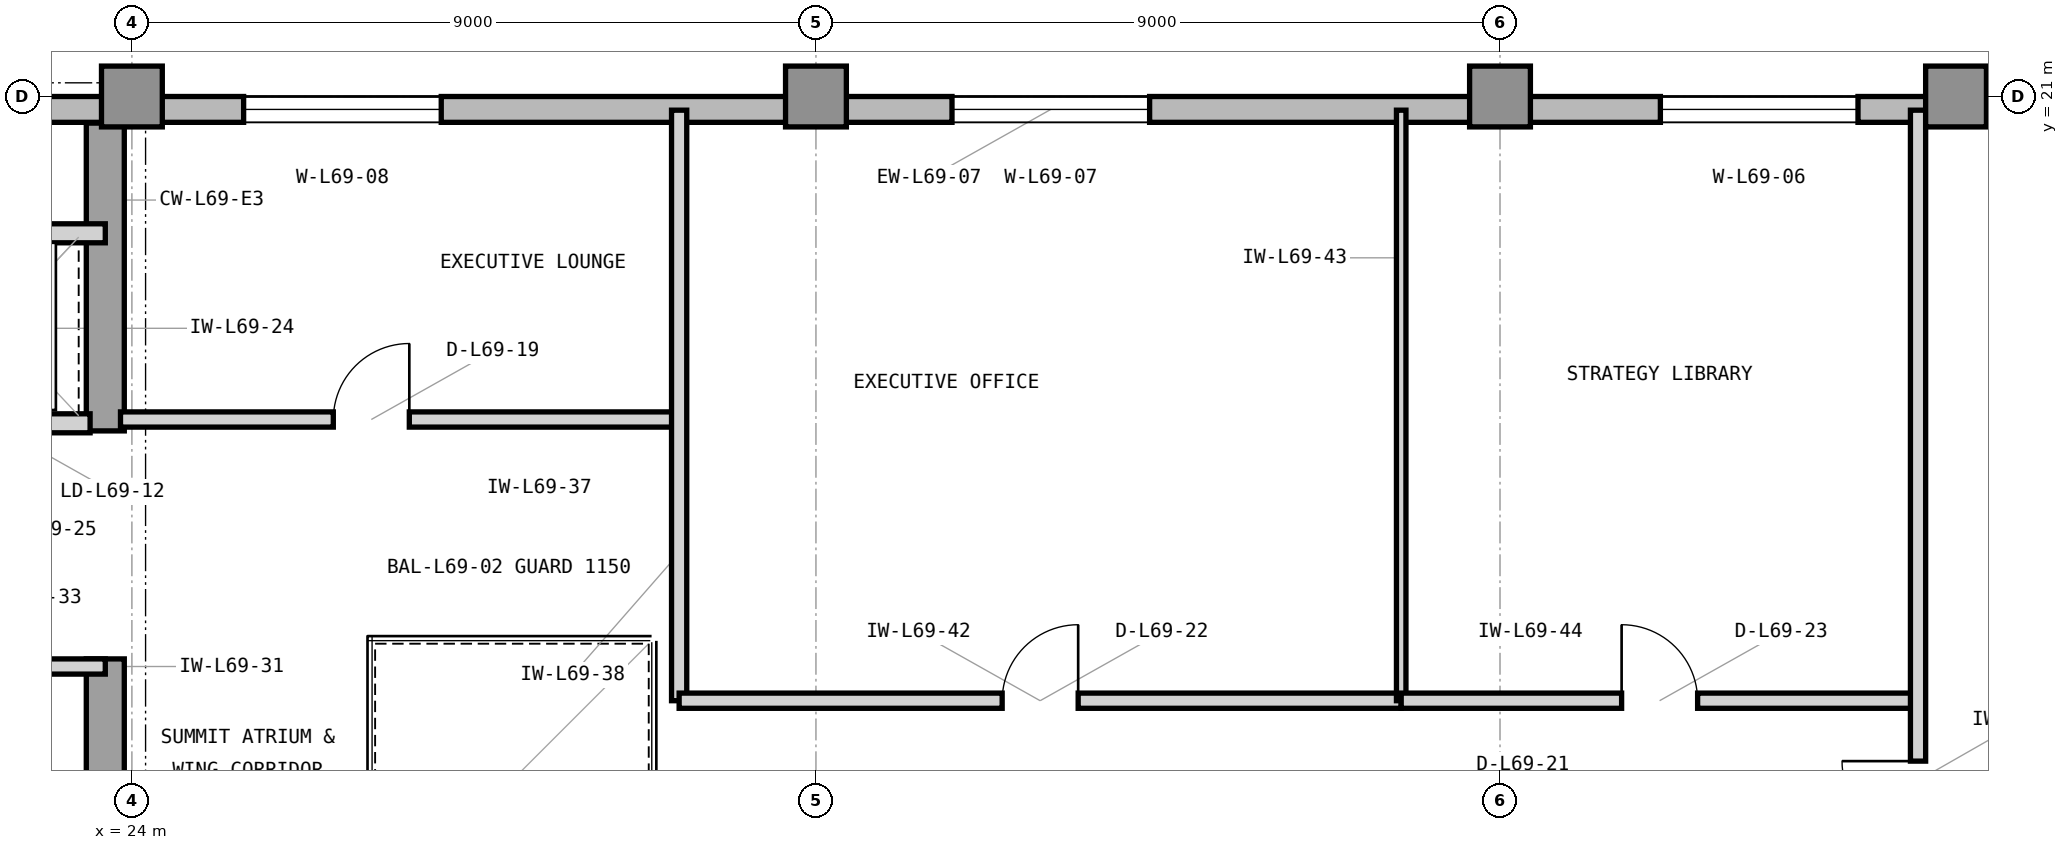
"""IFC4 building model, lengths in metres.
Left out: names, types, materials, properties, quantities, classifications, styles, units other than length and angle.
Written with IfcOpenShell. Run it as: python <this file> out.ifc"""

import sys

from ifc_helpers import new_model, si_unit, direction, frame, frame_2d, origin, origin_2d, place, context, subcontext, project, spatial, rectangle, extrude, element, fill, save


model = new_model("IFC4")
c1 = context("Model", 3, precision=1e-05, world=origin(), true_north=direction((0.0, 1.0)))
c2 = subcontext(c1, "Body", "Model", "MODEL_VIEW")
j1 = project(units=[si_unit("LENGTHUNIT", "METRE"), si_unit("PLANEANGLEUNIT", "RADIAN")], contexts=[c1])
p1 = place(None, origin())
s1 = spatial("IfcSite", under=j1, at=p1, CompositionType="ELEMENT")
p2 = place(p1, origin())
s2 = spatial("IfcBuilding", under=s1, at=p2, CompositionType="ELEMENT")
p3 = place(p2, frame((0.0, 0.0, 282.0)))
s3 = spatial("IfcBuildingStorey", under=s2, at=p3, CompositionType="ELEMENT", Elevation=282.0)
p4 = place(p3, frame((23.65, 10.4, 0.0), z_axis=(0.0, 0.0, 1.0), x_axis=(0.0, 1.0, 0.0)))
e1 = element("IfcWall", 1, at=p4, inside=s3, PredefinedType="SHEAR", context=c2, shape_type="SweptSolid", body=[
    extrude(rectangle(XDim=3.2, YDim=0.5, at=frame_2d((1.6, 0.0))), origin(), (0.0, 0.0, 1.0), 3.9),
])
p5 = place(p3, frame((23.65, 16.6, 0.0), z_axis=(0.0, 0.0, 1.0), x_axis=(0.0, 1.0, 0.0)))
e2 = element("IfcWall", 2, at=p5, inside=s3, PredefinedType="SHEAR", context=c2, shape_type="SweptSolid", body=[
    extrude(rectangle(XDim=4.05, YDim=0.5, at=frame_2d((2.025, 0.0))), origin(), (0.0, 0.0, 1.0), 3.9),
])
for number, where, z_axis, x_axis in (
    (3, (24.0, 21.0, 0.0), (0.0, 0.0, 1.0), (1.0, 0.0, 0.0)),
    (4, (33.0, 21.0, 0.0), (0.0, 0.0, 1.0), (1.0, 0.0, 0.0)),
    (5, (42.0, 21.0, 0.0), (0.0, 0.0, 1.0), (1.0, 0.0, 0.0)),
    (6, (48.0, 21.0, 0.0), (0.0, 0.0, 1.0), (1.0, 0.0, 0.0)),
):
    element("IfcColumn", number, at=place(p3, frame(where, z_axis=z_axis, x_axis=x_axis)), inside=s3, PredefinedType="COLUMN", context=c2, shape_type="SweptSolid", body=[
        extrude(rectangle(XDim=0.8, YDim=0.8, at=origin_2d()), origin(), (0.0, 0.0, 1.0), 3.9),
    ])
p6 = place(p3, frame((52.4, 20.83, 0.0), z_axis=(0.0, 0.0, 1.0), x_axis=(-1.0, 0.0, 0.0)))
e7 = element("IfcWall", 7, at=p6, inside=s3, PredefinedType="STANDARD", context=c2, shape_type="SweptSolid", body=[
    extrude(rectangle(XDim=32.62, YDim=0.34, at=frame_2d((16.31, 0.0))), origin(), (0.0, 0.0, 1.0), 3.715),
])
p7 = place(p6, frame((5.69, 0.0, 0.8)))
e8 = element("IfcOpeningElement", 8, at=p7, cuts=e7, PredefinedType="OPENING", context=c2, shape_type="SweptSolid", body=[
    extrude(rectangle(XDim=2.6, YDim=2.35, at=frame_2d((1.3, 1.175))), frame((0.0, 0.18, 0.0), z_axis=(0.0, -1.0, 0.0), x_axis=(1.0, 0.0, 0.0)), (0.0, 0.0, 1.0), 0.36),
])
p8 = place(p6, frame((15.01, 0.0, 0.8)))
e9 = element("IfcOpeningElement", 9, at=p8, cuts=e7, PredefinedType="OPENING", context=c2, shape_type="SweptSolid", body=[
    extrude(rectangle(XDim=2.6, YDim=2.35, at=frame_2d((1.3, 1.175))), frame((0.0, 0.18, 0.0), z_axis=(0.0, -1.0, 0.0), x_axis=(1.0, 0.0, 0.0)), (0.0, 0.0, 1.0), 0.36),
])
p9 = place(p6, frame((24.33, 0.0, 0.8)))
e10 = element("IfcOpeningElement", 10, at=p9, cuts=e7, PredefinedType="OPENING", context=c2, shape_type="SweptSolid", body=[
    extrude(rectangle(XDim=2.6, YDim=2.35, at=frame_2d((1.3, 1.175))), frame((0.0, 0.18, 0.0), z_axis=(0.0, -1.0, 0.0), x_axis=(1.0, 0.0, 0.0)), (0.0, 0.0, 1.0), 0.36),
])
p10 = place(p3, frame((21.05, 16.7, 0.0), z_axis=(0.0, 0.0, 1.0), x_axis=(1.0, 0.0, 0.0)))
e11 = element("IfcWall", 11, at=p10, inside=s3, PredefinedType="PARTITIONING", context=c2, shape_type="SweptSolid", body=[
    extrude(rectangle(XDim=2.4, YDim=0.25, at=frame_2d((1.2, 0.0))), origin(), (0.0, 0.0, 1.0), 3.354),
])
p11 = place(p10, frame((0.52, 0.0, 0.0)))
e12 = element("IfcOpeningElement", 12, at=p11, cuts=e11, PredefinedType="OPENING", context=c2, shape_type="SweptSolid", body=[
    extrude(rectangle(XDim=1.15, YDim=2.25, at=frame_2d((0.575, 1.125))), frame((0.0, 0.135, 0.0), z_axis=(0.0, -1.0, 0.0), x_axis=(1.0, 0.0, 0.0)), (0.0, 0.0, 1.0), 0.27),
])
p12 = place(p3, frame((16.45, 19.2, 0.0), z_axis=(0.0, 0.0, 1.0), x_axis=(1.0, 0.0, 0.0)))
e13 = element("IfcWall", 13, at=p12, inside=s3, PredefinedType="PARTITIONING", context=c2, shape_type="SweptSolid", body=[
    extrude(rectangle(XDim=7.2, YDim=0.25, at=frame_2d((3.6, 0.0))), origin(), (0.0, 0.0, 1.0), 3.63),
])
p13 = place(p3, frame((18.45, 13.5, 0.0), z_axis=(0.0, 0.0, 1.0), x_axis=(1.0, 0.0, 0.0)))
e14 = element("IfcWall", 14, at=p13, inside=s3, PredefinedType="PARTITIONING", context=c2, shape_type="SweptSolid", body=[
    extrude(rectangle(XDim=5.2, YDim=0.2, at=frame_2d((2.6, 0.0))), origin(), (0.0, 0.0, 1.0), 3.354),
])
p14 = place(p13, frame((2.125, 0.0, 0.0)))
e15 = element("IfcOpeningElement", 15, at=p14, cuts=e14, PredefinedType="OPENING", context=c2, shape_type="SweptSolid", body=[
    extrude(rectangle(XDim=0.95, YDim=2.1, at=frame_2d((0.475, 1.05))), frame((0.0, 0.11, 0.0), z_axis=(0.0, -1.0, 0.0), x_axis=(1.0, 0.0, 0.0)), (0.0, 0.0, 1.0), 0.22),
])
p15 = place(p3, frame((23.85, 16.75, 0.0), z_axis=(0.0, 0.0, 1.0), x_axis=(1.0, 0.0, 0.0)))
e16 = element("IfcWall", 16, at=p15, inside=s3, PredefinedType="PARTITIONING", context=c2, shape_type="SweptSolid", body=[
    extrude(rectangle(XDim=7.35, YDim=0.2, at=frame_2d((3.675, 0.0))), origin(), (0.0, 0.0, 1.0), 3.63),
])
p16 = place(p15, frame((2.8, 0.0, 0.0)))
e17 = element("IfcOpeningElement", 17, at=p16, cuts=e16, PredefinedType="OPENING", context=c2, shape_type="SweptSolid", body=[
    extrude(rectangle(XDim=1.0, YDim=2.15, at=frame_2d((0.5, 1.075))), frame((0.0, 0.11, 0.0), z_axis=(0.0, -1.0, 0.0), x_axis=(1.0, 0.0, 0.0)), (0.0, 0.0, 1.0), 0.22),
])
p17 = place(p3, frame((31.2, 13.05, 0.0), z_axis=(0.0, 0.0, 1.0), x_axis=(0.0, 1.0, 0.0)))
e18 = element("IfcWall", 18, at=p17, inside=s3, PredefinedType="PARTITIONING", context=c2, shape_type="SweptSolid", body=[
    extrude(rectangle(XDim=7.77, YDim=0.2, at=frame_2d((3.885, 0.0))), origin(), (0.0, 0.0, 1.0), 3.63),
])
p18 = place(p3, frame((31.2, 13.05, 0.0), z_axis=(0.0, 0.0, 1.0), x_axis=(1.0, 0.0, 0.0)))
e19 = element("IfcWall", 19, at=p18, inside=s3, PredefinedType="PARTITIONING", context=c2, shape_type="SweptSolid", body=[
    extrude(rectangle(XDim=9.5, YDim=0.2, at=frame_2d((4.75, 0.0))), origin(), (0.0, 0.0, 1.0), 3.63),
])
p19 = place(p18, frame((4.25, 0.0, 0.0)))
e20 = element("IfcOpeningElement", 20, at=p19, cuts=e19, PredefinedType="OPENING", context=c2, shape_type="SweptSolid", body=[
    extrude(rectangle(XDim=1.0, YDim=2.15, at=frame_2d((0.5, 1.075))), frame((0.0, 0.11, 0.0), z_axis=(0.0, -1.0, 0.0), x_axis=(1.0, 0.0, 0.0)), (0.0, 0.0, 1.0), 0.22),
])
p20 = place(p3, frame((40.7, 13.05, 0.0), z_axis=(0.0, 0.0, 1.0), x_axis=(0.0, 1.0, 0.0)))
e21 = element("IfcWall", 21, at=p20, inside=s3, PredefinedType="PARTITIONING", context=c2, shape_type="SweptSolid", body=[
    extrude(rectangle(XDim=7.77, YDim=0.125, at=frame_2d((3.885, 0.0))), origin(), (0.0, 0.0, 1.0), 3.63),
])
p21 = place(p3, frame((40.7, 13.05, 0.0), z_axis=(0.0, 0.0, 1.0), x_axis=(1.0, 0.0, 0.0)))
e22 = element("IfcWall", 22, at=p21, inside=s3, PredefinedType="PARTITIONING", context=c2, shape_type="SweptSolid", body=[
    extrude(rectangle(XDim=6.8, YDim=0.2, at=frame_2d((3.4, 0.0))), origin(), (0.0, 0.0, 1.0), 3.63),
])
p22 = place(p21, frame((2.9, 0.0, 0.0)))
e23 = element("IfcOpeningElement", 23, at=p22, cuts=e22, PredefinedType="OPENING", context=c2, shape_type="SweptSolid", body=[
    extrude(rectangle(XDim=1.0, YDim=2.15, at=frame_2d((0.5, 1.075))), frame((0.0, 0.11, 0.0), z_axis=(0.0, -1.0, 0.0), x_axis=(1.0, 0.0, 0.0)), (0.0, 0.0, 1.0), 0.22),
])
p23 = place(p3, frame((47.5, 3.18, 0.0), z_axis=(0.0, 0.0, 1.0), x_axis=(0.0, 1.0, 0.0)))
e24 = element("IfcWall", 24, at=p23, inside=s3, PredefinedType="PARTITIONING", context=c2, shape_type="SweptSolid", body=[
    extrude(rectangle(XDim=17.64, YDim=0.2, at=frame_2d((8.82, 0.0))), origin(), (0.0, 0.0, 1.0), 3.63),
])
p24 = place(p23, frame((8.075, 0.0, 0.0)))
e25 = element("IfcOpeningElement", 25, at=p24, cuts=e24, PredefinedType="OPENING", context=c2, shape_type="SweptSolid", body=[
    extrude(rectangle(XDim=1.0, YDim=2.15, at=frame_2d((0.5, 1.075))), frame((0.0, 0.11, 0.0), z_axis=(0.0, -1.0, 0.0), x_axis=(1.0, 0.0, 0.0)), (0.0, 0.0, 1.0), 0.22),
])
p25 = place(p7, origin())
e26 = element("IfcWindow", 26, at=p25, inside=s3, PartitioningType="SINGLE_PANEL", PredefinedType="WINDOW", context=c2, shape_type="SweptSolid", body=[
    extrude(rectangle(XDim=2.6, YDim=2.35, at=frame_2d((1.3, 1.175))), frame((0.0, 0.11, 0.0), z_axis=(0.0, -1.0, 0.0), x_axis=(1.0, 0.0, 0.0)), (0.0, 0.0, 1.0), 0.06),
])
fill(e8, e26)
p26 = place(p8, origin())
e27 = element("IfcWindow", 27, at=p26, inside=s3, PartitioningType="SINGLE_PANEL", PredefinedType="WINDOW", context=c2, shape_type="SweptSolid", body=[
    extrude(rectangle(XDim=2.6, YDim=2.35, at=frame_2d((1.3, 1.175))), frame((0.0, 0.11, 0.0), z_axis=(0.0, -1.0, 0.0), x_axis=(1.0, 0.0, 0.0)), (0.0, 0.0, 1.0), 0.06),
])
fill(e9, e27)
p27 = place(p9, origin())
e28 = element("IfcWindow", 28, at=p27, inside=s3, PartitioningType="SINGLE_PANEL", PredefinedType="WINDOW", context=c2, shape_type="SweptSolid", body=[
    extrude(rectangle(XDim=2.6, YDim=2.35, at=frame_2d((1.3, 1.175))), frame((0.0, 0.11, 0.0), z_axis=(0.0, -1.0, 0.0), x_axis=(1.0, 0.0, 0.0)), (0.0, 0.0, 1.0), 0.06),
])
fill(e10, e28)
p28 = place(p16, origin())
e29 = element("IfcDoor", 29, at=p28, inside=s3, OperationType="SINGLE_SWING_RIGHT", PredefinedType="DOOR", context=c2, shape_type="SweptSolid", body=[
    extrude(rectangle(XDim=1.0, YDim=2.15, at=frame_2d((0.5, 1.075))), frame((0.0, 0.025, 0.0), z_axis=(0.0, -1.0, 0.0), x_axis=(1.0, 0.0, 0.0)), (0.0, 0.0, 1.0), 0.05),
])
fill(e17, e29)
p29 = place(p19, origin())
e30 = element("IfcDoor", 30, at=p29, inside=s3, OperationType="SINGLE_SWING_RIGHT", PredefinedType="DOOR", context=c2, shape_type="SweptSolid", body=[
    extrude(rectangle(XDim=1.0, YDim=2.15, at=frame_2d((0.5, 1.075))), frame((0.0, 0.025, 0.0), z_axis=(0.0, -1.0, 0.0), x_axis=(1.0, 0.0, 0.0)), (0.0, 0.0, 1.0), 0.05),
])
fill(e20, e30)
p30 = place(p22, origin())
e31 = element("IfcDoor", 31, at=p30, inside=s3, OperationType="SINGLE_SWING_LEFT", PredefinedType="DOOR", context=c2, shape_type="SweptSolid", body=[
    extrude(rectangle(XDim=1.0, YDim=2.15, at=frame_2d((0.5, 1.075))), frame((0.0, 0.025, 0.0), z_axis=(0.0, -1.0, 0.0), x_axis=(1.0, 0.0, 0.0)), (0.0, 0.0, 1.0), 0.05),
])
fill(e23, e31)
p31 = place(p24, origin())
e32 = element("IfcDoor", 32, at=p31, inside=s3, OperationType="SINGLE_SWING_RIGHT", PredefinedType="DOOR", context=c2, shape_type="SweptSolid", body=[
    extrude(rectangle(XDim=1.0, YDim=2.15, at=frame_2d((0.5, 1.075))), frame((0.0, 0.025, 0.0), z_axis=(0.0, -1.0, 0.0), x_axis=(1.0, 0.0, 0.0)), (0.0, 0.0, 1.0), 0.05),
])
fill(e25, e32)
save(model, sys.argv[1])
